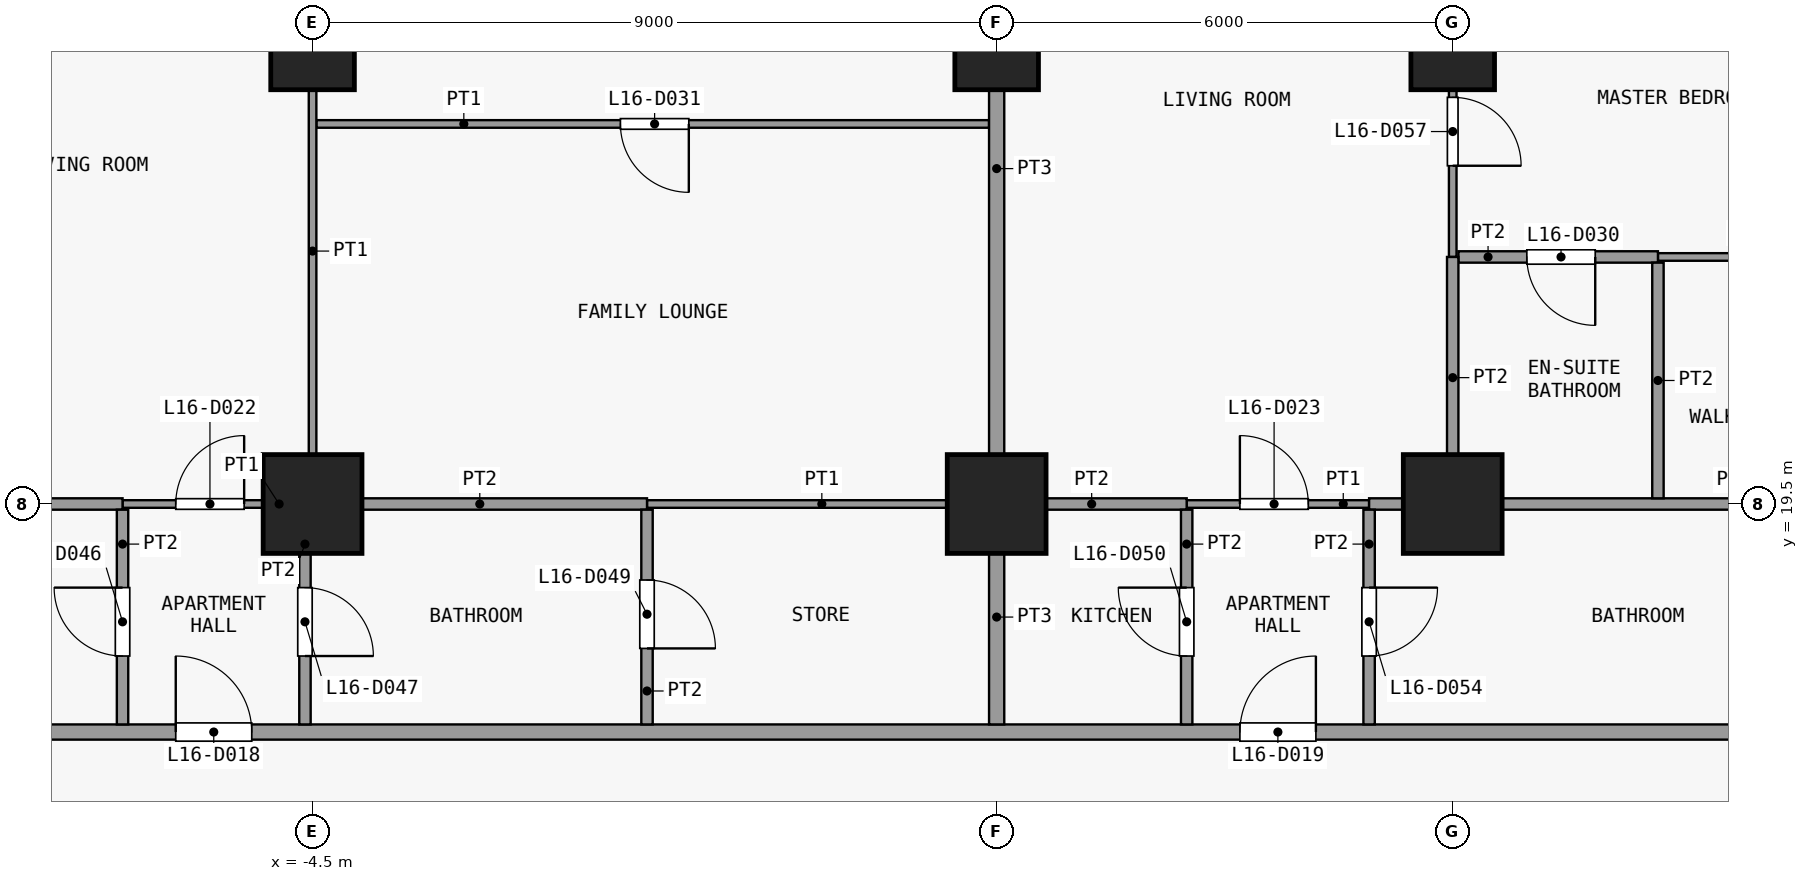
"""IFC4 building model, lengths in metres.
Left out: names, types, materials, properties, quantities, classifications, styles, units other than length and angle.
Written with IfcOpenShell. Run it as: python <this file> out.ifc"""

import sys

from ifc_helpers import new_model, si_unit, direction, frame, frame_2d, origin, origin_2d, place, context, subcontext, project, spatial, rectangle, extrude, element, fill, save


model = new_model("IFC4")
c1 = context("Model", 3, precision=1e-05, world=origin(), true_north=direction((0.0, 1.0)))
c2 = subcontext(c1, "Body", "Model", "MODEL_VIEW")
j1 = project(units=[si_unit("LENGTHUNIT", "METRE"), si_unit("PLANEANGLEUNIT", "RADIAN")], contexts=[c1])
p1 = place(None, origin())
s1 = spatial("IfcSite", under=j1, at=p1, CompositionType="ELEMENT")
p2 = place(p1, origin())
s2 = spatial("IfcBuilding", under=s1, at=p2, CompositionType="ELEMENT")
p3 = place(p2, frame((0.0, 0.0, 68.5)))
s3 = spatial("IfcBuildingStorey", under=s2, at=p3, CompositionType="ELEMENT", Elevation=68.5)
p4 = place(p3, frame((-4.5, 19.5, 0.0), z_axis=(0.0, 0.0, 1.0), x_axis=(1.0, 0.0, 0.0)))
e1 = element("IfcColumn", 1, at=p4, inside=s3, PredefinedType="COLUMN", context=c2, shape_type="SweptSolid", body=[
    extrude(rectangle(XDim=1.3, YDim=1.3, at=origin_2d()), origin(), (0.0, 0.0, 1.0), 3.6),
])
p5 = place(p3, frame((-4.5, 25.5, 0.0), z_axis=(0.0, 0.0, 1.0), x_axis=(1.0, 0.0, 0.0)))
e2 = element("IfcColumn", 2, at=p5, inside=s3, PredefinedType="COLUMN", context=c2, shape_type="SweptSolid", body=[
    extrude(rectangle(XDim=1.1, YDim=1.1, at=origin_2d()), origin(), (0.0, 0.0, 1.0), 3.6),
])
p6 = place(p3, frame((4.5, 19.5, 0.0), z_axis=(0.0, 0.0, 1.0), x_axis=(1.0, 0.0, 0.0)))
e3 = element("IfcColumn", 3, at=p6, inside=s3, PredefinedType="COLUMN", context=c2, shape_type="SweptSolid", body=[
    extrude(rectangle(XDim=1.3, YDim=1.3, at=origin_2d()), origin(), (0.0, 0.0, 1.0), 3.6),
])
p7 = place(p3, frame((4.5, 25.5, 0.0), z_axis=(0.0, 0.0, 1.0), x_axis=(1.0, 0.0, 0.0)))
e4 = element("IfcColumn", 4, at=p7, inside=s3, PredefinedType="COLUMN", context=c2, shape_type="SweptSolid", body=[
    extrude(rectangle(XDim=1.1, YDim=1.1, at=origin_2d()), origin(), (0.0, 0.0, 1.0), 3.6),
])
p8 = place(p3, frame((10.5, 19.5, 0.0), z_axis=(0.0, 0.0, 1.0), x_axis=(1.0, 0.0, 0.0)))
e5 = element("IfcColumn", 5, at=p8, inside=s3, PredefinedType="COLUMN", context=c2, shape_type="SweptSolid", body=[
    extrude(rectangle(XDim=1.3, YDim=1.3, at=origin_2d()), origin(), (0.0, 0.0, 1.0), 3.6),
])
p9 = place(p3, frame((10.5, 25.5, 0.0), z_axis=(0.0, 0.0, 1.0), x_axis=(1.0, 0.0, 0.0)))
e6 = element("IfcColumn", 6, at=p9, inside=s3, PredefinedType="COLUMN", context=c2, shape_type="SweptSolid", body=[
    extrude(rectangle(XDim=1.1, YDim=1.1, at=origin_2d()), origin(), (0.0, 0.0, 1.0), 3.6),
])
p10 = place(p3, frame((-25.35, 16.5, 0.0), z_axis=(0.0, 0.0, 1.0), x_axis=(1.0, 0.0, 0.0)))
e7 = element("IfcWall", 7, at=p10, inside=s3, PredefinedType="PARTITIONING", context=c2, shape_type="SweptSolid", body=[
    extrude(rectangle(XDim=50.7, YDim=0.2, at=frame_2d((25.35, 0.0))), origin(), (0.0, 0.0, 1.0), 3.3),
])
p11 = place(p10, frame((4.55, 0.0, 0.0)))
e8 = element("IfcOpeningElement", 8, at=p11, cuts=e7, PredefinedType="OPENING", context=c2, shape_type="SweptSolid", body=[
    extrude(rectangle(XDim=1.0, YDim=2.1, at=frame_2d((0.5, 1.05))), frame((0.0, 0.11, 0.0), z_axis=(0.0, -1.0, 0.0), x_axis=(1.0, 0.0, 0.0)), (0.0, 0.0, 1.0), 0.22),
])
p12 = place(p10, frame((19.05, 0.0, 0.0)))
e9 = element("IfcOpeningElement", 9, at=p12, cuts=e7, PredefinedType="OPENING", context=c2, shape_type="SweptSolid", body=[
    extrude(rectangle(XDim=1.0, YDim=2.1, at=frame_2d((0.5, 1.05))), frame((0.0, 0.11, 0.0), z_axis=(0.0, -1.0, 0.0), x_axis=(1.0, 0.0, 0.0)), (0.0, 0.0, 1.0), 0.22),
])
p13 = place(p10, frame((33.05, 0.0, 0.0)))
e10 = element("IfcOpeningElement", 10, at=p13, cuts=e7, PredefinedType="OPENING", context=c2, shape_type="SweptSolid", body=[
    extrude(rectangle(XDim=1.0, YDim=2.1, at=frame_2d((0.5, 1.05))), frame((0.0, 0.11, 0.0), z_axis=(0.0, -1.0, 0.0), x_axis=(1.0, 0.0, 0.0)), (0.0, 0.0, 1.0), 0.22),
])
p14 = place(p10, frame((45.05, 0.0, 0.0)))
e11 = element("IfcOpeningElement", 11, at=p14, cuts=e7, PredefinedType="OPENING", context=c2, shape_type="SweptSolid", body=[
    extrude(rectangle(XDim=1.0, YDim=2.1, at=frame_2d((0.5, 1.05))), frame((0.0, 0.11, 0.0), z_axis=(0.0, -1.0, 0.0), x_axis=(1.0, 0.0, 0.0)), (0.0, 0.0, 1.0), 0.22),
])
p15 = place(p3, frame((-7.0, 19.5, 0.0), z_axis=(0.0, 0.0, 1.0), x_axis=(1.0, 0.0, 0.0)))
e12 = element("IfcWall", 12, at=p15, inside=s3, PredefinedType="PARTITIONING", context=c2, shape_type="SweptSolid", body=[
    extrude(rectangle(XDim=2.4, YDim=0.1, at=frame_2d((1.2, 0.0))), origin(), (0.0, 0.0, 1.0), 3.3),
])
p16 = place(p15, frame((0.7, 0.0, 0.0)))
e13 = element("IfcOpeningElement", 13, at=p16, cuts=e12, PredefinedType="OPENING", context=c2, shape_type="SweptSolid", body=[
    extrude(rectangle(XDim=0.9, YDim=2.1, at=frame_2d((0.45, 1.05))), frame((0.0, 0.06, 0.0), z_axis=(0.0, -1.0, 0.0), x_axis=(1.0, 0.0, 0.0)), (0.0, 0.0, 1.0), 0.12),
])
p17 = place(p3, frame((-0.1, 19.5, 0.0), z_axis=(0.0, 0.0, 1.0), x_axis=(1.0, 0.0, 0.0)))
e14 = element("IfcWall", 14, at=p17, inside=s3, PredefinedType="PARTITIONING", context=c2, shape_type="SweptSolid", body=[
    extrude(rectangle(XDim=4.6, YDim=0.1, at=frame_2d((2.3, 0.0))), origin(), (0.0, 0.0, 1.0), 3.3),
])
p18 = place(p3, frame((7.0, 19.5, 0.0), z_axis=(0.0, 0.0, 1.0), x_axis=(1.0, 0.0, 0.0)))
e15 = element("IfcWall", 15, at=p18, inside=s3, PredefinedType="PARTITIONING", context=c2, shape_type="SweptSolid", body=[
    extrude(rectangle(XDim=2.4, YDim=0.1, at=frame_2d((1.2, 0.0))), origin(), (0.0, 0.0, 1.0), 3.3),
])
p19 = place(p18, frame((0.7, 0.0, 0.0)))
e16 = element("IfcOpeningElement", 16, at=p19, cuts=e15, PredefinedType="OPENING", context=c2, shape_type="SweptSolid", body=[
    extrude(rectangle(XDim=0.9, YDim=2.1, at=frame_2d((0.45, 1.05))), frame((0.0, 0.06, 0.0), z_axis=(0.0, -1.0, 0.0), x_axis=(1.0, 0.0, 0.0)), (0.0, 0.0, 1.0), 0.12),
])
p20 = place(p3, frame((-13.0, 19.5, 0.0), z_axis=(0.0, 0.0, 1.0), x_axis=(1.0, 0.0, 0.0)))
e17 = element("IfcWall", 17, at=p20, inside=s3, PredefinedType="PARTITIONING", context=c2, shape_type="SweptSolid", body=[
    extrude(rectangle(XDim=6.0, YDim=0.15, at=frame_2d((3.0, 0.0))), origin(), (0.0, 0.0, 1.0), 3.3),
])
p21 = place(p3, frame((-4.5, 19.5, 0.0), z_axis=(0.0, 0.0, 1.0), x_axis=(1.0, 0.0, 0.0)))
e18 = element("IfcWall", 18, at=p21, inside=s3, PredefinedType="PARTITIONING", context=c2, shape_type="SweptSolid", body=[
    extrude(rectangle(XDim=4.4, YDim=0.15, at=frame_2d((2.2, 0.0))), origin(), (0.0, 0.0, 1.0), 3.3),
])
p22 = place(p3, frame((4.5, 19.5, 0.0), z_axis=(0.0, 0.0, 1.0), x_axis=(1.0, 0.0, 0.0)))
e19 = element("IfcWall", 19, at=p22, inside=s3, PredefinedType="PARTITIONING", context=c2, shape_type="SweptSolid", body=[
    extrude(rectangle(XDim=2.5, YDim=0.15, at=frame_2d((1.25, 0.0))), origin(), (0.0, 0.0, 1.0), 3.3),
])
p23 = place(p3, frame((9.4, 19.5, 0.0), z_axis=(0.0, 0.0, 1.0), x_axis=(1.0, 0.0, 0.0)))
e20 = element("IfcWall", 20, at=p23, inside=s3, PredefinedType="PARTITIONING", context=c2, shape_type="SweptSolid", body=[
    extrude(rectangle(XDim=9.6, YDim=0.15, at=frame_2d((4.8, 0.0))), origin(), (0.0, 0.0, 1.0), 3.3),
])
p24 = place(p3, frame((13.2, 22.75, 0.0), z_axis=(0.0, 0.0, 1.0), x_axis=(1.0, 0.0, 0.0)))
e21 = element("IfcWall", 21, at=p24, inside=s3, PredefinedType="PARTITIONING", context=c2, shape_type="SweptSolid", body=[
    extrude(rectangle(XDim=3.2, YDim=0.1, at=frame_2d((1.6, 0.0))), origin(), (0.0, 0.0, 1.0), 3.3),
])
p25 = place(p24, frame((1.1, 0.0, 0.0)))
e22 = element("IfcOpeningElement", 22, at=p25, cuts=e21, PredefinedType="OPENING", context=c2, shape_type="SweptSolid", body=[
    extrude(rectangle(XDim=0.9, YDim=2.1, at=frame_2d((0.45, 1.05))), frame((0.0, 0.06, 0.0), z_axis=(0.0, -1.0, 0.0), x_axis=(1.0, 0.0, 0.0)), (0.0, 0.0, 1.0), 0.12),
])
p26 = place(p3, frame((10.575, 22.75, 0.0), z_axis=(0.0, 0.0, 1.0), x_axis=(1.0, 0.0, 0.0)))
e23 = element("IfcWall", 23, at=p26, inside=s3, PredefinedType="PARTITIONING", context=c2, shape_type="SweptSolid", body=[
    extrude(rectangle(XDim=2.625, YDim=0.15, at=frame_2d((1.312, 0.0))), origin(), (0.0, 0.0, 1.0), 3.3),
])
p27 = place(p26, frame((0.9, 0.0, 0.0)))
e24 = element("IfcOpeningElement", 24, at=p27, cuts=e23, PredefinedType="OPENING", context=c2, shape_type="SweptSolid", body=[
    extrude(rectangle(XDim=0.9, YDim=2.1, at=frame_2d((0.45, 1.05))), frame((0.0, 0.085, 0.0), z_axis=(0.0, -1.0, 0.0), x_axis=(1.0, 0.0, 0.0)), (0.0, 0.0, 1.0), 0.17),
])
p28 = place(p3, frame((-4.45, 24.5, 0.0), z_axis=(0.0, 0.0, 1.0), x_axis=(1.0, 0.0, 0.0)))
e25 = element("IfcWall", 25, at=p28, inside=s3, PredefinedType="PARTITIONING", context=c2, shape_type="SweptSolid", body=[
    extrude(rectangle(XDim=8.85, YDim=0.1, at=frame_2d((4.425, 0.0))), origin(), (0.0, 0.0, 1.0), 3.3),
])
p29 = place(p28, frame((4.0, 0.0, 0.0)))
e26 = element("IfcOpeningElement", 26, at=p29, cuts=e25, PredefinedType="OPENING", context=c2, shape_type="SweptSolid", body=[
    extrude(rectangle(XDim=0.9, YDim=2.1, at=frame_2d((0.45, 1.05))), frame((0.0, 0.06, 0.0), z_axis=(0.0, -1.0, 0.0), x_axis=(1.0, 0.0, 0.0)), (0.0, 0.0, 1.0), 0.12),
])
p30 = place(p3, frame((-7.0, 16.6, 0.0), z_axis=(0.0, 0.0, 1.0), x_axis=(0.0, 1.0, 0.0)))
e27 = element("IfcWall", 27, at=p30, inside=s3, PredefinedType="PARTITIONING", context=c2, shape_type="SweptSolid", body=[
    extrude(rectangle(XDim=2.825, YDim=0.15, at=frame_2d((1.413, 0.0))), origin(), (0.0, 0.0, 1.0), 3.3),
])
p31 = place(p30, frame((0.9, 0.0, 0.0)))
e28 = element("IfcOpeningElement", 28, at=p31, cuts=e27, PredefinedType="OPENING", context=c2, shape_type="SweptSolid", body=[
    extrude(rectangle(XDim=0.9, YDim=2.1, at=frame_2d((0.45, 1.05))), frame((0.0, 0.085, 0.0), z_axis=(0.0, -1.0, 0.0), x_axis=(1.0, 0.0, 0.0)), (0.0, 0.0, 1.0), 0.17),
])
p32 = place(p3, frame((-4.6, 16.6, 0.0), z_axis=(0.0, 0.0, 1.0), x_axis=(0.0, 1.0, 0.0)))
e29 = element("IfcWall", 29, at=p32, inside=s3, PredefinedType="PARTITIONING", context=c2, shape_type="SweptSolid", body=[
    extrude(rectangle(XDim=2.825, YDim=0.15, at=frame_2d((1.413, 0.0))), origin(), (0.0, 0.0, 1.0), 3.3),
])
p33 = place(p32, frame((0.9, 0.0, 0.0)))
e30 = element("IfcOpeningElement", 30, at=p33, cuts=e29, PredefinedType="OPENING", context=c2, shape_type="SweptSolid", body=[
    extrude(rectangle(XDim=0.9, YDim=2.1, at=frame_2d((0.45, 1.05))), frame((0.0, 0.085, 0.0), z_axis=(0.0, -1.0, 0.0), x_axis=(1.0, 0.0, 0.0)), (0.0, 0.0, 1.0), 0.17),
])
p34 = place(p3, frame((-4.5, 19.575, 0.0), z_axis=(0.0, 0.0, 1.0), x_axis=(0.0, 1.0, 0.0)))
e31 = element("IfcWall", 31, at=p34, inside=s3, PredefinedType="PARTITIONING", context=c2, shape_type="SweptSolid", body=[
    extrude(rectangle(XDim=8.675, YDim=0.1, at=frame_2d((4.337, 0.0))), origin(), (0.0, 0.0, 1.0), 3.3),
])
p35 = place(p34, frame((6.625, 0.0, 0.0)))
e32 = element("IfcOpeningElement", 32, at=p35, cuts=e31, PredefinedType="OPENING", context=c2, shape_type="SweptSolid", body=[
    extrude(rectangle(XDim=0.9, YDim=2.1, at=frame_2d((0.45, 1.05))), frame((0.0, 0.06, 0.0), z_axis=(0.0, -1.0, 0.0), x_axis=(1.0, 0.0, 0.0)), (0.0, 0.0, 1.0), 0.12),
])
p36 = place(p3, frame((-0.1, 16.6, 0.0), z_axis=(0.0, 0.0, 1.0), x_axis=(0.0, 1.0, 0.0)))
e33 = element("IfcWall", 33, at=p36, inside=s3, PredefinedType="PARTITIONING", context=c2, shape_type="SweptSolid", body=[
    extrude(rectangle(XDim=2.825, YDim=0.15, at=frame_2d((1.413, 0.0))), origin(), (0.0, 0.0, 1.0), 3.3),
])
p37 = place(p36, frame((1.0, 0.0, 0.0)))
e34 = element("IfcOpeningElement", 34, at=p37, cuts=e33, PredefinedType="OPENING", context=c2, shape_type="SweptSolid", body=[
    extrude(rectangle(XDim=0.9, YDim=2.1, at=frame_2d((0.45, 1.05))), frame((0.0, 0.085, 0.0), z_axis=(0.0, -1.0, 0.0), x_axis=(1.0, 0.0, 0.0)), (0.0, 0.0, 1.0), 0.17),
])
p38 = place(p3, frame((4.5, 16.6, 0.0), z_axis=(0.0, 0.0, 1.0), x_axis=(0.0, 1.0, 0.0)))
e35 = element("IfcWall", 35, at=p38, inside=s3, PredefinedType="PARTITIONING", context=c2, shape_type="SweptSolid", body=[
    extrude(rectangle(XDim=2.825, YDim=0.2, at=frame_2d((1.413, 0.0))), origin(), (0.0, 0.0, 1.0), 3.3),
])
p39 = place(p3, frame((4.5, 19.575, 0.0), z_axis=(0.0, 0.0, 1.0), x_axis=(0.0, 1.0, 0.0)))
e36 = element("IfcWall", 36, at=p39, inside=s3, PredefinedType="PARTITIONING", context=c2, shape_type="SweptSolid", body=[
    extrude(rectangle(XDim=8.675, YDim=0.2, at=frame_2d((4.337, 0.0))), origin(), (0.0, 0.0, 1.0), 3.3),
])
p40 = place(p3, frame((7.0, 16.6, 0.0), z_axis=(0.0, 0.0, 1.0), x_axis=(0.0, 1.0, 0.0)))
e37 = element("IfcWall", 37, at=p40, inside=s3, PredefinedType="PARTITIONING", context=c2, shape_type="SweptSolid", body=[
    extrude(rectangle(XDim=2.825, YDim=0.15, at=frame_2d((1.413, 0.0))), origin(), (0.0, 0.0, 1.0), 3.3),
])
p41 = place(p40, frame((0.9, 0.0, 0.0)))
e38 = element("IfcOpeningElement", 38, at=p41, cuts=e37, PredefinedType="OPENING", context=c2, shape_type="SweptSolid", body=[
    extrude(rectangle(XDim=0.9, YDim=2.1, at=frame_2d((0.45, 1.05))), frame((0.0, 0.085, 0.0), z_axis=(0.0, -1.0, 0.0), x_axis=(1.0, 0.0, 0.0)), (0.0, 0.0, 1.0), 0.17),
])
p42 = place(p3, frame((9.4, 16.6, 0.0), z_axis=(0.0, 0.0, 1.0), x_axis=(0.0, 1.0, 0.0)))
e39 = element("IfcWall", 39, at=p42, inside=s3, PredefinedType="PARTITIONING", context=c2, shape_type="SweptSolid", body=[
    extrude(rectangle(XDim=2.825, YDim=0.15, at=frame_2d((1.413, 0.0))), origin(), (0.0, 0.0, 1.0), 3.3),
])
p43 = place(p42, frame((0.9, 0.0, 0.0)))
e40 = element("IfcOpeningElement", 40, at=p43, cuts=e39, PredefinedType="OPENING", context=c2, shape_type="SweptSolid", body=[
    extrude(rectangle(XDim=0.9, YDim=2.1, at=frame_2d((0.45, 1.05))), frame((0.0, 0.085, 0.0), z_axis=(0.0, -1.0, 0.0), x_axis=(1.0, 0.0, 0.0)), (0.0, 0.0, 1.0), 0.17),
])
p44 = place(p3, frame((10.5, 22.75, 0.0), z_axis=(0.0, 0.0, 1.0), x_axis=(0.0, 1.0, 0.0)))
e41 = element("IfcWall", 41, at=p44, inside=s3, PredefinedType="PARTITIONING", context=c2, shape_type="SweptSolid", body=[
    extrude(rectangle(XDim=4.1, YDim=0.1, at=frame_2d((2.05, 0.0))), origin(), (0.0, 0.0, 1.0), 3.3),
])
p45 = place(p44, frame((1.2, 0.0, 0.0)))
e42 = element("IfcOpeningElement", 42, at=p45, cuts=e41, PredefinedType="OPENING", context=c2, shape_type="SweptSolid", body=[
    extrude(rectangle(XDim=0.9, YDim=2.1, at=frame_2d((0.45, 1.05))), frame((0.0, 0.06, 0.0), z_axis=(0.0, -1.0, 0.0), x_axis=(1.0, 0.0, 0.0)), (0.0, 0.0, 1.0), 0.12),
])
p46 = place(p3, frame((10.5, 19.575, 0.0), z_axis=(0.0, 0.0, 1.0), x_axis=(0.0, 1.0, 0.0)))
e43 = element("IfcWall", 43, at=p46, inside=s3, PredefinedType="PARTITIONING", context=c2, shape_type="SweptSolid", body=[
    extrude(rectangle(XDim=3.175, YDim=0.15, at=frame_2d((1.587, 0.0))), origin(), (0.0, 0.0, 1.0), 3.3),
])
p47 = place(p3, frame((13.2, 19.575, 0.0), z_axis=(0.0, 0.0, 1.0), x_axis=(0.0, 1.0, 0.0)))
e44 = element("IfcWall", 44, at=p47, inside=s3, PredefinedType="PARTITIONING", context=c2, shape_type="SweptSolid", body=[
    extrude(rectangle(XDim=3.1, YDim=0.15, at=frame_2d((1.55, 0.0))), origin(), (0.0, 0.0, 1.0), 3.3),
])
p48 = place(p12, origin())
e45 = element("IfcDoor", 45, at=p48, inside=s3, OperationType="SINGLE_SWING_RIGHT", PredefinedType="DOOR", context=c2, shape_type="SweptSolid", body=[
    extrude(rectangle(XDim=1.0, YDim=2.1, at=frame_2d((0.5, 1.05))), frame((0.0, 0.025, 0.0), z_axis=(0.0, -1.0, 0.0), x_axis=(1.0, 0.0, 0.0)), (0.0, 0.0, 1.0), 0.05),
])
fill(e9, e45)
p49 = place(p13, origin())
e46 = element("IfcDoor", 46, at=p49, inside=s3, OperationType="SINGLE_SWING_LEFT", PredefinedType="DOOR", context=c2, shape_type="SweptSolid", body=[
    extrude(rectangle(XDim=1.0, YDim=2.1, at=frame_2d((0.5, 1.05))), frame((0.0, 0.025, 0.0), z_axis=(0.0, -1.0, 0.0), x_axis=(1.0, 0.0, 0.0)), (0.0, 0.0, 1.0), 0.05),
])
fill(e10, e46)
p50 = place(p16, origin())
e47 = element("IfcDoor", 47, at=p50, inside=s3, OperationType="SINGLE_SWING_LEFT", PredefinedType="DOOR", context=c2, shape_type="SweptSolid", body=[
    extrude(rectangle(XDim=0.9, YDim=2.1, at=frame_2d((0.45, 1.05))), frame((0.0, 0.025, 0.0), z_axis=(0.0, -1.0, 0.0), x_axis=(1.0, 0.0, 0.0)), (0.0, 0.0, 1.0), 0.05),
])
fill(e13, e47)
p51 = place(p19, origin())
e48 = element("IfcDoor", 48, at=p51, inside=s3, OperationType="SINGLE_SWING_RIGHT", PredefinedType="DOOR", context=c2, shape_type="SweptSolid", body=[
    extrude(rectangle(XDim=0.9, YDim=2.1, at=frame_2d((0.45, 1.05))), frame((0.0, 0.025, 0.0), z_axis=(0.0, -1.0, 0.0), x_axis=(1.0, 0.0, 0.0)), (0.0, 0.0, 1.0), 0.05),
])
fill(e16, e48)
p52 = place(p27, origin())
e49 = element("IfcDoor", 49, at=p52, inside=s3, OperationType="SINGLE_SWING_RIGHT", PredefinedType="DOOR", context=c2, shape_type="SweptSolid", body=[
    extrude(rectangle(XDim=0.9, YDim=2.1, at=frame_2d((0.45, 1.05))), frame((0.0, 0.025, 0.0), z_axis=(0.0, -1.0, 0.0), x_axis=(1.0, 0.0, 0.0)), (0.0, 0.0, 1.0), 0.05),
])
fill(e24, e49)
p53 = place(p29, origin())
e50 = element("IfcDoor", 50, at=p53, inside=s3, OperationType="SINGLE_SWING_RIGHT", PredefinedType="DOOR", context=c2, shape_type="SweptSolid", body=[
    extrude(rectangle(XDim=0.9, YDim=2.1, at=frame_2d((0.45, 1.05))), frame((0.0, 0.025, 0.0), z_axis=(0.0, -1.0, 0.0), x_axis=(1.0, 0.0, 0.0)), (0.0, 0.0, 1.0), 0.05),
])
fill(e26, e50)
p54 = place(p31, origin())
e51 = element("IfcDoor", 51, at=p54, inside=s3, OperationType="SINGLE_SWING_LEFT", PredefinedType="DOOR", context=c2, shape_type="SweptSolid", body=[
    extrude(rectangle(XDim=0.9, YDim=2.1, at=frame_2d((0.45, 1.05))), frame((0.0, 0.025, 0.0), z_axis=(0.0, -1.0, 0.0), x_axis=(1.0, 0.0, 0.0)), (0.0, 0.0, 1.0), 0.05),
])
fill(e28, e51)
p55 = place(p33, origin())
e52 = element("IfcDoor", 52, at=p55, inside=s3, OperationType="SINGLE_SWING_LEFT", PredefinedType="DOOR", context=c2, shape_type="SweptSolid", body=[
    extrude(rectangle(XDim=0.9, YDim=2.1, at=frame_2d((0.45, 1.05))), frame((0.0, 0.025, 0.0), z_axis=(0.0, -1.0, 0.0), x_axis=(1.0, 0.0, 0.0)), (0.0, 0.0, 1.0), 0.05),
])
fill(e30, e52)
p56 = place(p37, origin())
e53 = element("IfcDoor", 53, at=p56, inside=s3, OperationType="SINGLE_SWING_LEFT", PredefinedType="DOOR", context=c2, shape_type="SweptSolid", body=[
    extrude(rectangle(XDim=0.9, YDim=2.1, at=frame_2d((0.45, 1.05))), frame((0.0, 0.025, 0.0), z_axis=(0.0, -1.0, 0.0), x_axis=(1.0, 0.0, 0.0)), (0.0, 0.0, 1.0), 0.05),
])
fill(e34, e53)
p57 = place(p41, origin())
e54 = element("IfcDoor", 54, at=p57, inside=s3, OperationType="SINGLE_SWING_LEFT", PredefinedType="DOOR", context=c2, shape_type="SweptSolid", body=[
    extrude(rectangle(XDim=0.9, YDim=2.1, at=frame_2d((0.45, 1.05))), frame((0.0, 0.025, 0.0), z_axis=(0.0, -1.0, 0.0), x_axis=(1.0, 0.0, 0.0)), (0.0, 0.0, 1.0), 0.05),
])
fill(e38, e54)
p58 = place(p43, origin())
e55 = element("IfcDoor", 55, at=p58, inside=s3, OperationType="SINGLE_SWING_RIGHT", PredefinedType="DOOR", context=c2, shape_type="SweptSolid", body=[
    extrude(rectangle(XDim=0.9, YDim=2.1, at=frame_2d((0.45, 1.05))), frame((0.0, 0.025, 0.0), z_axis=(0.0, -1.0, 0.0), x_axis=(1.0, 0.0, 0.0)), (0.0, 0.0, 1.0), 0.05),
])
fill(e40, e55)
p59 = place(p45, origin())
e56 = element("IfcDoor", 56, at=p59, inside=s3, OperationType="SINGLE_SWING_LEFT", PredefinedType="DOOR", context=c2, shape_type="SweptSolid", body=[
    extrude(rectangle(XDim=0.9, YDim=2.1, at=frame_2d((0.45, 1.05))), frame((0.0, 0.025, 0.0), z_axis=(0.0, -1.0, 0.0), x_axis=(1.0, 0.0, 0.0)), (0.0, 0.0, 1.0), 0.05),
])
fill(e42, e56)
save(model, sys.argv[1])
